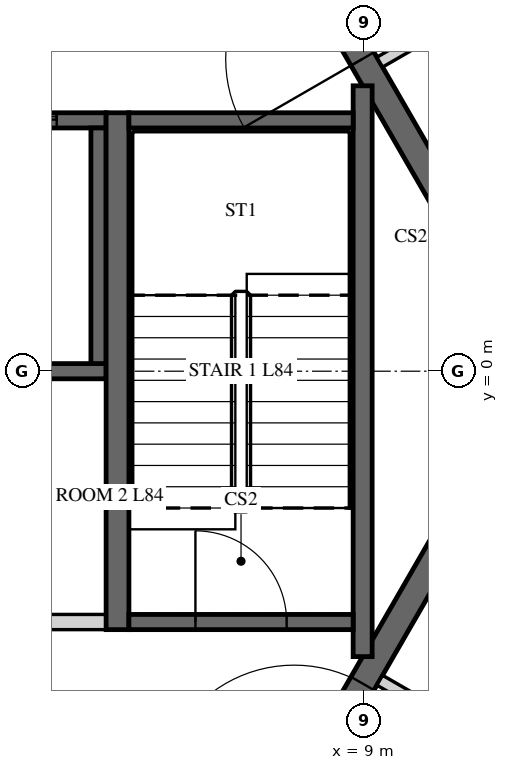
"""IFC4 building model, lengths in metres.
Left out: names, types, materials, properties, quantities, classifications, styles, units other than length and angle.
Written with IfcOpenShell. Run it as: python <this file> out.ifc"""

import sys

from ifc_helpers import new_model, si_unit, direction, frame, frame_2d, origin, place, context, subcontext, project, spatial, polyline, rectangle, outline, extrude, element, fill, save


model = new_model("IFC4")
c1 = context("Model", 3, precision=1e-05, world=origin(), true_north=direction((0.0, 1.0)))
c2 = subcontext(c1, "Body", "Model", "MODEL_VIEW")
j1 = project(units=[si_unit("LENGTHUNIT", "METRE"), si_unit("PLANEANGLEUNIT", "RADIAN")], contexts=[c1])
p1 = place(None, origin())
s1 = spatial("IfcSite", under=j1, at=p1, CompositionType="ELEMENT")
p2 = place(p1, origin())
s2 = spatial("IfcBuilding", under=s1, at=p2, CompositionType="ELEMENT")
p3 = place(p2, frame((0.0, 0.0, 349.5)))
s3 = spatial("IfcBuildingStorey", under=s2, at=p3, CompositionType="ELEMENT", Elevation=349.5)
p4 = place(p3, frame((5.673, -9.825, 0.0), z_axis=(0.0, 0.0, 1.0), x_axis=(0.499995046907, 0.866028263435, 0.0)))
e1 = element("IfcWall", 1, at=p4, inside=s3, PredefinedType="SHEAR", context=c2, shape_type="SweptSolid", body=[
    extrude(outline(polyline([(-0.101, -0.175), (11.446, -0.175), (11.244, 0.175), (0.101, 0.175), (-0.101, -0.175)])), origin(), (0.0, 0.0, 1.0), 3.75),
])
p5 = place(p4, frame((4.801, 0.0, 0.0)))
e2 = element("IfcOpeningElement", 2, at=p5, cuts=e1, PredefinedType="OPENING", context=c2, shape_type="SweptSolid", body=[
    extrude(rectangle(XDim=1.8, YDim=2.4, at=frame_2d((0.9, 1.2))), frame((0.0, 0.185, 0.0), z_axis=(0.0, -1.0, 0.0), x_axis=(1.0, 0.0, 0.0)), (0.0, 0.0, 1.0), 0.37),
])
p6 = place(p3, frame((11.345, 0.0, 0.0), z_axis=(0.0, 0.0, 1.0), x_axis=(-0.499995046907, 0.866028263435, 0.0)))
e3 = element("IfcWall", 3, at=p6, inside=s3, PredefinedType="SHEAR", context=c2, shape_type="SweptSolid", body=[
    extrude(outline(polyline([(-0.101, -0.175), (11.446, -0.175), (11.244, 0.175), (0.101, 0.175), (-0.101, -0.175)])), origin(), (0.0, 0.0, 1.0), 3.75),
])
p7 = place(p6, frame((4.744, 0.0, 0.0)))
e4 = element("IfcOpeningElement", 4, at=p7, cuts=e3, PredefinedType="OPENING", context=c2, shape_type="SweptSolid", body=[
    extrude(rectangle(XDim=1.8, YDim=2.4, at=frame_2d((0.9, 1.2))), frame((0.0, 0.185, 0.0), z_axis=(0.0, -1.0, 0.0), x_axis=(1.0, 0.0, 0.0)), (0.0, 0.0, 1.0), 0.37),
])
p8 = place(p3, frame((3.4, 3.3, -0.5), z_axis=(0.0, 0.0, 1.0), x_axis=(1.0, 0.0, 0.0)))
e5 = element("IfcWall", 5, at=p8, inside=s3, PredefinedType="SHEAR", context=c2, shape_type="SweptSolid", body=[
    extrude(rectangle(XDim=2.2, YDim=0.2, at=frame_2d((1.1, 0.0))), origin(), (0.0, 0.0, 1.0), 4.15),
])
p9 = place(p8, frame((0.45, 0.0, 0.5)))
e6 = element("IfcOpeningElement", 6, at=p9, cuts=e5, PredefinedType="OPENING", context=c2, shape_type="SweptSolid", body=[
    extrude(rectangle(XDim=1.1, YDim=2.1, at=frame_2d((0.55, 1.05))), frame((0.0, 0.11, 0.0), z_axis=(0.0, -1.0, 0.0), x_axis=(1.0, 0.0, 0.0)), (0.0, 0.0, 1.0), 0.22),
])
p10 = place(p3, frame((-5.6, 0.0, -0.5), z_axis=(0.0, 0.0, 1.0), x_axis=(1.0, 0.0, 0.0)))
e7 = element("IfcWall", 7, at=p10, inside=s3, PredefinedType="SHEAR", context=c2, shape_type="SweptSolid", body=[
    extrude(rectangle(XDim=11.2, YDim=0.2, at=frame_2d((5.6, 0.0))), origin(), (0.0, 0.0, 1.0), 4.15),
])
p11 = place(p3, frame((5.5, 0.1, -0.5), z_axis=(0.0, 0.0, 1.0), x_axis=(0.0, 1.0, 0.0)))
e8 = element("IfcWall", 8, at=p11, inside=s3, PredefinedType="SHEAR", context=c2, shape_type="SweptSolid", body=[
    extrude(rectangle(XDim=3.1, YDim=0.2, at=frame_2d((1.55, 0.0))), origin(), (0.0, 0.0, 1.0), 4.15),
])
p12 = place(p3, frame((2.75, -3.3, 0.0), z_axis=(0.0, 0.0, 1.0), x_axis=(1.0, 0.0, 0.0)))
e9 = element("IfcWall", 9, at=p12, inside=s3, PredefinedType="PARTITIONING", context=c2, shape_type="SweptSolid", body=[
    extrude(rectangle(XDim=2.85, YDim=0.2, at=frame_2d((1.425, 0.0))), origin(), (0.0, 0.0, 1.0), 3.65),
])
p13 = place(p12, frame((1.075, 0.0, 0.0)))
e10 = element("IfcOpeningElement", 10, at=p13, cuts=e9, PredefinedType="OPENING", context=c2, shape_type="SweptSolid", body=[
    extrude(rectangle(XDim=0.9, YDim=2.1, at=frame_2d((0.45, 1.05))), frame((0.0, 0.11, 0.0), z_axis=(0.0, -1.0, 0.0), x_axis=(1.0, 0.0, 0.0)), (0.0, 0.0, 1.0), 0.22),
])
p14 = place(p3, frame((5.75, -3.4, -0.5), z_axis=(0.0, 0.0, 1.0), x_axis=(0.0, 1.0, 0.0)))
e11 = element("IfcWall", 11, at=p14, inside=s3, PredefinedType="SHEAR", context=c2, shape_type="SweptSolid", body=[
    extrude(rectangle(XDim=6.8, YDim=0.3, at=frame_2d((3.4, 0.0))), origin(), (0.0, 0.0, 1.0), 4.15),
])
p15 = place(p3, frame((8.975, -3.755, -0.5), z_axis=(0.0, 0.0, 1.0), x_axis=(0.0, 1.0, 0.0)))
e12 = element("IfcWall", 12, at=p15, inside=s3, PredefinedType="SHEAR", context=c2, shape_type="SweptSolid", body=[
    extrude(rectangle(XDim=7.51, YDim=0.25, at=frame_2d((3.755, 0.0))), origin(), (0.0, 0.0, 1.0), 4.15),
])
p16 = place(p3, frame((5.9, 3.3, -0.5), z_axis=(0.0, 0.0, 1.0), x_axis=(1.0, 0.0, 0.0)))
e13 = element("IfcWall", 13, at=p16, inside=s3, PredefinedType="SHEAR", context=c2, shape_type="SweptSolid", body=[
    extrude(rectangle(XDim=2.95, YDim=0.2, at=frame_2d((1.475, 0.0))), origin(), (0.0, 0.0, 1.0), 4.15),
])
p17 = place(p3, frame((5.9, -3.3, -0.5), z_axis=(0.0, 0.0, 1.0), x_axis=(1.0, 0.0, 0.0)))
e14 = element("IfcWall", 14, at=p17, inside=s3, PredefinedType="SHEAR", context=c2, shape_type="SweptSolid", body=[
    extrude(rectangle(XDim=2.95, YDim=0.2, at=frame_2d((1.475, 0.0))), origin(), (0.0, 0.0, 1.0), 4.15),
])
p18 = place(p17, frame((0.875, 0.0, 0.5)))
e15 = element("IfcOpeningElement", 15, at=p18, cuts=e14, PredefinedType="OPENING", context=c2, shape_type="SweptSolid", body=[
    extrude(rectangle(XDim=1.2, YDim=2.4, at=frame_2d((0.6, 1.2))), frame((0.0, 0.11, 0.0), z_axis=(0.0, -1.0, 0.0), x_axis=(1.0, 0.0, 0.0)), (0.0, 0.0, 1.0), 0.22),
])
p19 = place(p3, frame((17.873, -1.193, 0.0), z_axis=(0.0, 0.0, 1.0), x_axis=(-0.559195650252, 0.829035719821, 0.0)))
e16 = element("IfcWall", 16, at=p19, inside=s3, PredefinedType="PARTITIONING", context=c2, shape_type="SweptSolid", body=[
    extrude(rectangle(XDim=15.688, YDim=0.15, at=frame_2d((7.844, 0.0))), origin(), (0.0, 0.0, 1.0), 2.82),
])
p20 = place(p19, frame((5.792, 0.0, 0.0)))
e17 = element("IfcOpeningElement", 17, at=p20, cuts=e16, PredefinedType="OPENING", context=c2, shape_type="SweptSolid", body=[
    extrude(rectangle(XDim=1.0, YDim=2.1, at=frame_2d((0.5, 1.05))), frame((0.0, 0.085, 0.0), z_axis=(0.0, -1.0, 0.0), x_axis=(1.0, 0.0, 0.0)), (0.0, 0.0, 1.0), 0.17),
])
p21 = place(p3, frame((9.2, 4.066, 0.0), z_axis=(0.0, 0.0, 1.0), x_axis=(0.866038240688, 0.499977765172, 0.0)))
e18 = element("IfcWall", 18, at=p21, inside=s3, PredefinedType="PARTITIONING", context=c2, shape_type="SweptSolid", body=[
    extrude(rectangle(XDim=2.456, YDim=0.15, at=frame_2d((1.228, 0.0))), origin(), (0.0, 0.0, 1.0), 2.82),
])
p22 = place(p3, frame((12.902, -6.203, 0.0), z_axis=(0.0, 0.0, 1.0), x_axis=(-0.866023907196, 0.500002592159, 0.0)))
e19 = element("IfcWall", 19, at=p22, inside=s3, PredefinedType="PARTITIONING", context=c2, shape_type="SweptSolid", body=[
    extrude(rectangle(XDim=4.275, YDim=0.15, at=frame_2d((2.137, 0.0))), origin(), (0.0, 0.0, 1.0), 2.82),
])
p23 = place(p7, origin())
e20 = element("IfcDoor", 20, at=p23, inside=s3, OperationType="DOUBLE_DOOR_SINGLE_SWING", PredefinedType="DOOR", context=c2, shape_type="SweptSolid", body=[
    extrude(rectangle(XDim=1.8, YDim=2.4, at=frame_2d((0.9, 1.2))), frame((0.0, 0.025, 0.0), z_axis=(0.0, -1.0, 0.0), x_axis=(1.0, 0.0, 0.0)), (0.0, 0.0, 1.0), 0.05),
])
fill(e4, e20)
p24 = place(p5, origin())
e21 = element("IfcDoor", 21, at=p24, inside=s3, OperationType="DOUBLE_DOOR_SINGLE_SWING", PredefinedType="DOOR", context=c2, shape_type="SweptSolid", body=[
    extrude(rectangle(XDim=1.8, YDim=2.4, at=frame_2d((0.9, 1.2))), frame((0.0, 0.025, 0.0), z_axis=(0.0, -1.0, 0.0), x_axis=(1.0, 0.0, 0.0)), (0.0, 0.0, 1.0), 0.05),
])
fill(e2, e21)
p25 = place(p18, origin())
e22 = element("IfcDoor", 22, at=p25, inside=s3, OperationType="SINGLE_SWING_LEFT", PredefinedType="DOOR", context=c2, shape_type="SweptSolid", body=[
    extrude(rectangle(XDim=1.2, YDim=2.4, at=frame_2d((0.6, 1.2))), frame((0.0, 0.025, 0.0), z_axis=(0.0, -1.0, 0.0), x_axis=(1.0, 0.0, 0.0)), (0.0, 0.0, 1.0), 0.05),
])
fill(e15, e22)
p26 = place(p9, origin())
e23 = element("IfcDoor", 23, at=p26, inside=s3, OperationType="SLIDING_TO_LEFT", PredefinedType="DOOR", context=c2, shape_type="SweptSolid", body=[
    extrude(rectangle(XDim=1.1, YDim=2.1, at=frame_2d((0.55, 1.05))), frame((0.0, 0.025, 0.0), z_axis=(0.0, -1.0, 0.0), x_axis=(1.0, 0.0, 0.0)), (0.0, 0.0, 1.0), 0.05),
])
fill(e6, e23)
save(model, sys.argv[1])
